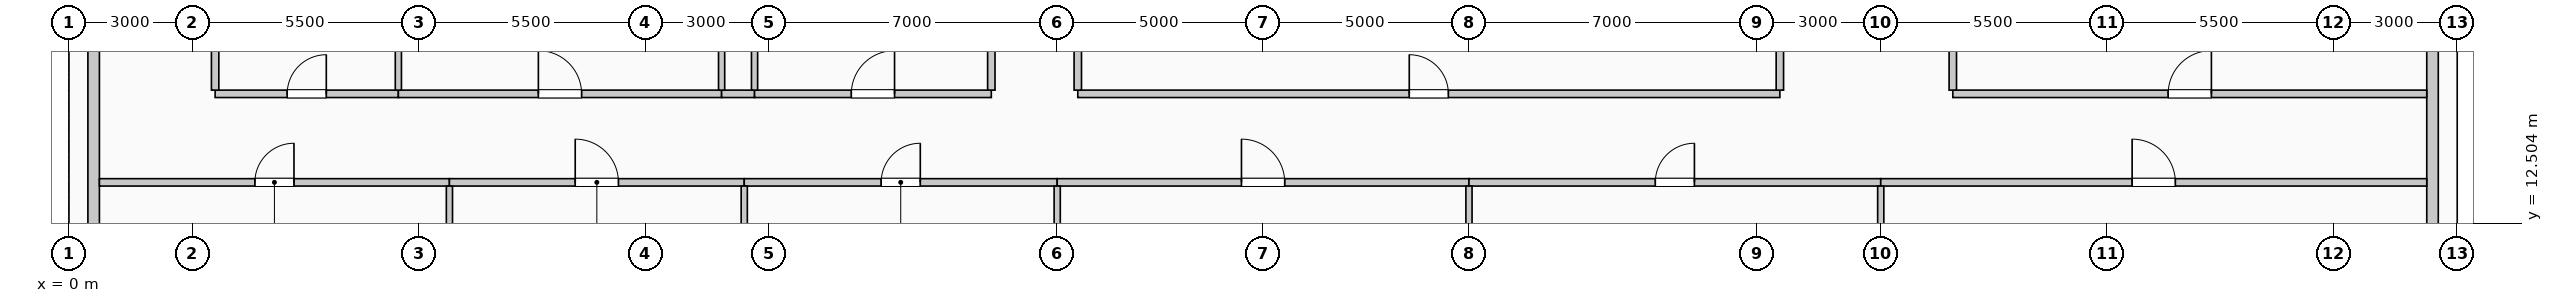
"""IFC4 building model, lengths in metres.
Left out: names, types, materials, properties, quantities, classifications, styles, units other than length and angle.
Written with IfcOpenShell. Run it as: python <this file> out.ifc"""

import sys

from ifc_helpers import new_model, si_unit, direction, frame, frame_2d, origin, place, context, subcontext, project, spatial, rectangle, extrude, element, fill, save


model = new_model("IFC4")
c1 = context("Model", 3, precision=1e-05, world=origin(), true_north=direction((0.0, 1.0)))
c2 = subcontext(c1, "Body", "Model", "MODEL_VIEW")
j1 = project(units=[si_unit("LENGTHUNIT", "METRE"), si_unit("PLANEANGLEUNIT", "RADIAN")], contexts=[c1])
p1 = place(None, origin())
s1 = spatial("IfcSite", under=j1, at=p1, CompositionType="ELEMENT")
p2 = place(p1, origin())
s2 = spatial("IfcBuilding", under=s1, at=p2, CompositionType="ELEMENT")
p3 = place(p2, frame((0.0, 0.0, 136.6)))
s3 = spatial("IfcBuildingStorey", under=s2, at=p3, CompositionType="ELEMENT", Elevation=136.6)
for number, where, z_axis, x_axis in (
    (1, (0.6, 10.445, 0.0), (0.0, 0.0, 1.0), (0.0, 1.0, 0.0)),
    (2, (57.4, 17.555, 0.0), (0.0, 0.0, 1.0), (0.0, -1.0, 0.0)),
):
    element("IfcWall", number, at=place(p3, frame(where, z_axis=z_axis, x_axis=x_axis)), inside=s3, PredefinedType="SOLIDWALL", context=c2, shape_type="SweptSolid", body=[
        extrude(rectangle(XDim=7.11, YDim=0.28, at=frame_2d((3.555, 0.0))), origin(), (0.0, 0.0, 1.0), 2.875),
    ])
p4 = place(p3, frame((0.74, 13.5, 0.0), z_axis=(0.0, 0.0, 1.0), x_axis=(1.0, 0.0, 0.0)))
e3 = element("IfcWall", 3, at=p4, inside=s3, PredefinedType="PARTITIONING", context=c2, shape_type="SweptSolid", body=[
    extrude(rectangle(XDim=8.5, YDim=0.18, at=frame_2d((4.25, 0.0))), origin(), (0.0, 0.0, 1.0), 3.725),
])
p5 = place(p4, frame((3.775, 0.0, 0.0)))
e4 = element("IfcOpeningElement", 4, at=p5, cuts=e3, PredefinedType="OPENING", context=c2, shape_type="SweptSolid", body=[
    extrude(rectangle(XDim=0.95, YDim=2.15, at=frame_2d((0.475, 1.075))), frame((0.0, 0.1, 0.0), z_axis=(0.0, -1.0, 0.0), x_axis=(1.0, 0.0, 0.0)), (0.0, 0.0, 1.0), 0.2),
])
p6 = place(p3, frame((9.24, 13.5, 0.0), z_axis=(0.0, 0.0, 1.0), x_axis=(1.0, 0.0, 0.0)))
e5 = element("IfcWall", 5, at=p6, inside=s3, PredefinedType="PARTITIONING", context=c2, shape_type="SweptSolid", body=[
    extrude(rectangle(XDim=7.16, YDim=0.18, at=frame_2d((3.58, 0.0))), origin(), (0.0, 0.0, 1.0), 3.725),
])
p7 = place(p6, frame((3.055, 0.0, 0.0)))
e6 = element("IfcOpeningElement", 6, at=p7, cuts=e5, PredefinedType="OPENING", context=c2, shape_type="SweptSolid", body=[
    extrude(rectangle(XDim=1.05, YDim=2.15, at=frame_2d((0.525, 1.075))), frame((0.0, 0.1, 0.0), z_axis=(0.0, -1.0, 0.0), x_axis=(1.0, 0.0, 0.0)), (0.0, 0.0, 1.0), 0.2),
])
p8 = place(p3, frame((16.4, 13.5, 0.0), z_axis=(0.0, 0.0, 1.0), x_axis=(1.0, 0.0, 0.0)))
e7 = element("IfcWall", 7, at=p8, inside=s3, PredefinedType="PARTITIONING", context=c2, shape_type="SweptSolid", body=[
    extrude(rectangle(XDim=7.6, YDim=0.18, at=frame_2d((3.8, 0.0))), origin(), (0.0, 0.0, 1.0), 3.725),
])
p9 = place(p8, frame((3.325, 0.0, 0.0)))
e8 = element("IfcOpeningElement", 8, at=p9, cuts=e7, PredefinedType="OPENING", context=c2, shape_type="SweptSolid", body=[
    extrude(rectangle(XDim=0.95, YDim=2.15, at=frame_2d((0.475, 1.075))), frame((0.0, 0.1, 0.0), z_axis=(0.0, -1.0, 0.0), x_axis=(1.0, 0.0, 0.0)), (0.0, 0.0, 1.0), 0.2),
])
p10 = place(p3, frame((24.0, 13.5, 0.0), z_axis=(0.0, 0.0, 1.0), x_axis=(1.0, 0.0, 0.0)))
e9 = element("IfcWall", 9, at=p10, inside=s3, PredefinedType="PARTITIONING", context=c2, shape_type="SweptSolid", body=[
    extrude(rectangle(XDim=10.0, YDim=0.18, at=frame_2d((5.0, 0.0))), origin(), (0.0, 0.0, 1.0), 3.725),
])
p11 = place(p10, frame((4.475, 0.0, 0.0)))
e10 = element("IfcOpeningElement", 10, at=p11, cuts=e9, PredefinedType="OPENING", context=c2, shape_type="SweptSolid", body=[
    extrude(rectangle(XDim=1.05, YDim=2.15, at=frame_2d((0.525, 1.075))), frame((0.0, 0.1, 0.0), z_axis=(0.0, -1.0, 0.0), x_axis=(1.0, 0.0, 0.0)), (0.0, 0.0, 1.0), 0.2),
])
p12 = place(p3, frame((34.0, 13.5, 0.0), z_axis=(0.0, 0.0, 1.0), x_axis=(1.0, 0.0, 0.0)))
e11 = element("IfcWall", 11, at=p12, inside=s3, PredefinedType="PARTITIONING", context=c2, shape_type="SweptSolid", body=[
    extrude(rectangle(XDim=10.0, YDim=0.18, at=frame_2d((5.0, 0.0))), origin(), (0.0, 0.0, 1.0), 3.725),
])
p13 = place(p12, frame((4.525, 0.0, 0.0)))
e12 = element("IfcOpeningElement", 12, at=p13, cuts=e11, PredefinedType="OPENING", context=c2, shape_type="SweptSolid", body=[
    extrude(rectangle(XDim=0.95, YDim=2.15, at=frame_2d((0.475, 1.075))), frame((0.0, 0.1, 0.0), z_axis=(0.0, -1.0, 0.0), x_axis=(1.0, 0.0, 0.0)), (0.0, 0.0, 1.0), 0.2),
])
p14 = place(p3, frame((44.0, 13.5, 0.0), z_axis=(0.0, 0.0, 1.0), x_axis=(1.0, 0.0, 0.0)))
e13 = element("IfcWall", 13, at=p14, inside=s3, PredefinedType="PARTITIONING", context=c2, shape_type="SweptSolid", body=[
    extrude(rectangle(XDim=13.26, YDim=0.18, at=frame_2d((6.63, 0.0))), origin(), (0.0, 0.0, 1.0), 3.725),
])
p15 = place(p14, frame((6.105, 0.0, 0.0)))
e14 = element("IfcOpeningElement", 14, at=p15, cuts=e13, PredefinedType="OPENING", context=c2, shape_type="SweptSolid", body=[
    extrude(rectangle(XDim=1.05, YDim=2.15, at=frame_2d((0.525, 1.075))), frame((0.0, 0.1, 0.0), z_axis=(0.0, -1.0, 0.0), x_axis=(1.0, 0.0, 0.0)), (0.0, 0.0, 1.0), 0.2),
])
p16 = place(p3, frame((3.55, 15.65, 0.0), z_axis=(0.0, 0.0, 1.0), x_axis=(1.0, 0.0, 0.0)))
e15 = element("IfcWall", 15, at=p16, inside=s3, PredefinedType="PARTITIONING", context=c2, shape_type="SweptSolid", body=[
    extrude(rectangle(XDim=4.45, YDim=0.18, at=frame_2d((2.225, 0.0))), origin(), (0.0, 0.0, 1.0), 3.725),
])
p17 = place(p16, frame((1.75, 0.0, 0.0)))
e16 = element("IfcOpeningElement", 16, at=p17, cuts=e15, PredefinedType="OPENING", context=c2, shape_type="SweptSolid", body=[
    extrude(rectangle(XDim=0.95, YDim=2.15, at=frame_2d((0.475, 1.075))), frame((0.0, 0.1, 0.0), z_axis=(0.0, -1.0, 0.0), x_axis=(1.0, 0.0, 0.0)), (0.0, 0.0, 1.0), 0.2),
])
p18 = place(p3, frame((8.0, 15.65, 0.0), z_axis=(0.0, 0.0, 1.0), x_axis=(1.0, 0.0, 0.0)))
e17 = element("IfcWall", 17, at=p18, inside=s3, PredefinedType="PARTITIONING", context=c2, shape_type="SweptSolid", body=[
    extrude(rectangle(XDim=7.85, YDim=0.18, at=frame_2d((3.925, 0.0))), origin(), (0.0, 0.0, 1.0), 3.725),
])
p19 = place(p18, frame((3.4, 0.0, 0.0)))
e18 = element("IfcOpeningElement", 18, at=p19, cuts=e17, PredefinedType="OPENING", context=c2, shape_type="SweptSolid", body=[
    extrude(rectangle(XDim=1.05, YDim=2.15, at=frame_2d((0.525, 1.075))), frame((0.0, 0.1, 0.0), z_axis=(0.0, -1.0, 0.0), x_axis=(1.0, 0.0, 0.0)), (0.0, 0.0, 1.0), 0.2),
])
p20 = place(p3, frame((15.85, 15.65, 0.0), z_axis=(0.0, 0.0, 1.0), x_axis=(1.0, 0.0, 0.0)))
e19 = element("IfcWall", 19, at=p20, inside=s3, PredefinedType="PARTITIONING", context=c2, shape_type="SweptSolid", body=[
    extrude(rectangle(XDim=0.8, YDim=0.18, at=frame_2d((0.4, 0.0))), origin(), (0.0, 0.0, 1.0), 3.725),
])
p21 = place(p3, frame((16.65, 15.65, 0.0), z_axis=(0.0, 0.0, 1.0), x_axis=(1.0, 0.0, 0.0)))
e20 = element("IfcWall", 20, at=p21, inside=s3, PredefinedType="PARTITIONING", context=c2, shape_type="SweptSolid", body=[
    extrude(rectangle(XDim=5.75, YDim=0.18, at=frame_2d((2.875, 0.0))), origin(), (0.0, 0.0, 1.0), 3.725),
])
p22 = place(p21, frame((2.35, 0.0, 0.0)))
e21 = element("IfcOpeningElement", 21, at=p22, cuts=e20, PredefinedType="OPENING", context=c2, shape_type="SweptSolid", body=[
    extrude(rectangle(XDim=1.05, YDim=2.15, at=frame_2d((0.525, 1.075))), frame((0.0, 0.1, 0.0), z_axis=(0.0, -1.0, 0.0), x_axis=(1.0, 0.0, 0.0)), (0.0, 0.0, 1.0), 0.2),
])
p23 = place(p3, frame((24.5, 15.65, 0.0), z_axis=(0.0, 0.0, 1.0), x_axis=(1.0, 0.0, 0.0)))
e22 = element("IfcWall", 22, at=p23, inside=s3, PredefinedType="PARTITIONING", context=c2, shape_type="SweptSolid", body=[
    extrude(rectangle(XDim=17.05, YDim=0.18, at=frame_2d((8.525, 0.0))), origin(), (0.0, 0.0, 1.0), 3.725),
])
p24 = place(p23, frame((8.05, 0.0, 0.0)))
e23 = element("IfcOpeningElement", 23, at=p24, cuts=e22, PredefinedType="OPENING", context=c2, shape_type="SweptSolid", body=[
    extrude(rectangle(XDim=0.95, YDim=2.15, at=frame_2d((0.475, 1.075))), frame((0.0, 0.1, 0.0), z_axis=(0.0, -1.0, 0.0), x_axis=(1.0, 0.0, 0.0)), (0.0, 0.0, 1.0), 0.2),
])
p25 = place(p3, frame((45.75, 15.65, 0.0), z_axis=(0.0, 0.0, 1.0), x_axis=(1.0, 0.0, 0.0)))
e24 = element("IfcWall", 24, at=p25, inside=s3, PredefinedType="PARTITIONING", context=c2, shape_type="SweptSolid", body=[
    extrude(rectangle(XDim=11.51, YDim=0.18, at=frame_2d((5.755, 0.0))), origin(), (0.0, 0.0, 1.0), 3.725),
])
p26 = place(p25, frame((5.23, 0.0, 0.0)))
e25 = element("IfcOpeningElement", 25, at=p26, cuts=e24, PredefinedType="OPENING", context=c2, shape_type="SweptSolid", body=[
    extrude(rectangle(XDim=1.05, YDim=2.15, at=frame_2d((0.525, 1.075))), frame((0.0, 0.1, 0.0), z_axis=(0.0, -1.0, 0.0), x_axis=(1.0, 0.0, 0.0)), (0.0, 0.0, 1.0), 0.2),
])
p27 = place(p3, frame((3.55, 15.74, 0.0), z_axis=(0.0, 0.0, 1.0), x_axis=(0.0, 1.0, 0.0)))
e26 = element("IfcWall", 26, at=p27, inside=s3, PredefinedType="PARTITIONING", context=c2, shape_type="SweptSolid", body=[
    extrude(rectangle(XDim=3.135, YDim=0.18, at=frame_2d((1.567, 0.0))), origin(), (0.0, 0.0, 1.0), 3.725),
])
p28 = place(p3, frame((8.0, 15.74, 0.0), z_axis=(0.0, 0.0, 1.0), x_axis=(0.0, 1.0, 0.0)))
e27 = element("IfcWall", 27, at=p28, inside=s3, PredefinedType="PARTITIONING", context=c2, shape_type="SweptSolid", body=[
    extrude(rectangle(XDim=3.135, YDim=0.15, at=frame_2d((1.567, 0.0))), origin(), (0.0, 0.0, 1.0), 3.725),
])
p29 = place(p3, frame((9.24, 0.74, 0.0), z_axis=(0.0, 0.0, 1.0), x_axis=(0.0, 1.0, 0.0)))
e28 = element("IfcWall", 28, at=p29, inside=s3, PredefinedType="PARTITIONING", context=c2, shape_type="SweptSolid", body=[
    extrude(rectangle(XDim=12.67, YDim=0.15, at=frame_2d((6.335, 0.0))), origin(), (0.0, 0.0, 1.0), 3.725),
])
p30 = place(p3, frame((15.85, 15.74, 0.0), z_axis=(0.0, 0.0, 1.0), x_axis=(0.0, 1.0, 0.0)))
e29 = element("IfcWall", 29, at=p30, inside=s3, PredefinedType="PARTITIONING", context=c2, shape_type="SweptSolid", body=[
    extrude(rectangle(XDim=1.76, YDim=0.15, at=frame_2d((0.88, 0.0))), origin(), (0.0, 0.0, 1.0), 3.725),
])
p31 = place(p3, frame((16.4, 1.3, 0.0), z_axis=(0.0, 0.0, 1.0), x_axis=(0.0, 1.0, 0.0)))
e30 = element("IfcWall", 30, at=p31, inside=s3, PredefinedType="PARTITIONING", context=c2, shape_type="SweptSolid", body=[
    extrude(rectangle(XDim=12.11, YDim=0.15, at=frame_2d((6.055, 0.0))), origin(), (0.0, 0.0, 1.0), 3.07),
])
p32 = place(p3, frame((16.65, 15.74, 0.0), z_axis=(0.0, 0.0, 1.0), x_axis=(0.0, 1.0, 0.0)))
e31 = element("IfcWall", 31, at=p32, inside=s3, PredefinedType="PARTITIONING", context=c2, shape_type="SweptSolid", body=[
    extrude(rectangle(XDim=1.76, YDim=0.15, at=frame_2d((0.88, 0.0))), origin(), (0.0, 0.0, 1.0), 3.07),
])
p33 = place(p3, frame((22.4, 15.74, 0.0), z_axis=(0.0, 0.0, 1.0), x_axis=(0.0, 1.0, 0.0)))
e32 = element("IfcWall", 32, at=p33, inside=s3, PredefinedType="PARTITIONING", context=c2, shape_type="SweptSolid", body=[
    extrude(rectangle(XDim=13.985, YDim=0.18, at=frame_2d((6.993, 0.0))), origin(), (0.0, 0.0, 1.0), 3.725),
])
p34 = place(p3, frame((24.0, 1.3, 0.0), z_axis=(0.0, 0.0, 1.0), x_axis=(0.0, 1.0, 0.0)))
e33 = element("IfcWall", 33, at=p34, inside=s3, PredefinedType="PARTITIONING", context=c2, shape_type="SweptSolid", body=[
    extrude(rectangle(XDim=12.11, YDim=0.15, at=frame_2d((6.055, 0.0))), origin(), (0.0, 0.0, 1.0), 3.725),
])
p35 = place(p3, frame((24.5, 15.74, 0.0), z_axis=(0.0, 0.0, 1.0), x_axis=(0.0, 1.0, 0.0)))
e34 = element("IfcWall", 34, at=p35, inside=s3, PredefinedType="PARTITIONING", context=c2, shape_type="SweptSolid", body=[
    extrude(rectangle(XDim=15.97, YDim=0.18, at=frame_2d((7.985, 0.0))), origin(), (0.0, 0.0, 1.0), 3.725),
])
p36 = place(p3, frame((34.0, 1.3, 0.0), z_axis=(0.0, 0.0, 1.0), x_axis=(0.0, 1.0, 0.0)))
e35 = element("IfcWall", 35, at=p36, inside=s3, PredefinedType="PARTITIONING", context=c2, shape_type="SweptSolid", body=[
    extrude(rectangle(XDim=12.11, YDim=0.15, at=frame_2d((6.055, 0.0))), origin(), (0.0, 0.0, 1.0), 3.725),
])
p37 = place(p3, frame((41.55, 15.74, 0.0), z_axis=(0.0, 0.0, 1.0), x_axis=(0.0, 1.0, 0.0)))
e36 = element("IfcWall", 36, at=p37, inside=s3, PredefinedType="PARTITIONING", context=c2, shape_type="SweptSolid", body=[
    extrude(rectangle(XDim=1.76, YDim=0.18, at=frame_2d((0.88, 0.0))), origin(), (0.0, 0.0, 1.0), 3.07),
])
p38 = place(p3, frame((44.0, 1.175, 0.0), z_axis=(0.0, 0.0, 1.0), x_axis=(0.0, 1.0, 0.0)))
e37 = element("IfcWall", 37, at=p38, inside=s3, PredefinedType="PARTITIONING", context=c2, shape_type="SweptSolid", body=[
    extrude(rectangle(XDim=12.235, YDim=0.15, at=frame_2d((6.117, 0.0))), origin(), (0.0, 0.0, 1.0), 3.725),
])
p39 = place(p3, frame((45.75, 15.74, 0.0), z_axis=(0.0, 0.0, 1.0), x_axis=(0.0, 1.0, 0.0)))
e38 = element("IfcWall", 38, at=p39, inside=s3, PredefinedType="PARTITIONING", context=c2, shape_type="SweptSolid", body=[
    extrude(rectangle(XDim=16.535, YDim=0.18, at=frame_2d((8.268, 0.0))), origin(), (0.0, 0.0, 1.0), 3.725),
])
p40 = place(p5, origin())
e39 = element("IfcDoor", 39, at=p40, inside=s3, OperationType="SINGLE_SWING_RIGHT", PredefinedType="DOOR", context=c2, shape_type="SweptSolid", body=[
    extrude(rectangle(XDim=0.95, YDim=2.15, at=frame_2d((0.475, 1.075))), frame((0.0, 0.025, 0.0), z_axis=(0.0, -1.0, 0.0), x_axis=(1.0, 0.0, 0.0)), (0.0, 0.0, 1.0), 0.05),
])
fill(e4, e39)
p41 = place(p7, origin())
e40 = element("IfcDoor", 40, at=p41, inside=s3, OperationType="SINGLE_SWING_LEFT", PredefinedType="DOOR", context=c2, shape_type="SweptSolid", body=[
    extrude(rectangle(XDim=1.05, YDim=2.15, at=frame_2d((0.525, 1.075))), frame((0.0, 0.025, 0.0), z_axis=(0.0, -1.0, 0.0), x_axis=(1.0, 0.0, 0.0)), (0.0, 0.0, 1.0), 0.05),
])
fill(e6, e40)
p42 = place(p9, origin())
e41 = element("IfcDoor", 41, at=p42, inside=s3, OperationType="SINGLE_SWING_RIGHT", PredefinedType="DOOR", context=c2, shape_type="SweptSolid", body=[
    extrude(rectangle(XDim=0.95, YDim=2.15, at=frame_2d((0.475, 1.075))), frame((0.0, 0.025, 0.0), z_axis=(0.0, -1.0, 0.0), x_axis=(1.0, 0.0, 0.0)), (0.0, 0.0, 1.0), 0.05),
])
fill(e8, e41)
p43 = place(p11, origin())
e42 = element("IfcDoor", 42, at=p43, inside=s3, OperationType="SINGLE_SWING_LEFT", PredefinedType="DOOR", context=c2, shape_type="SweptSolid", body=[
    extrude(rectangle(XDim=1.05, YDim=2.15, at=frame_2d((0.525, 1.075))), frame((0.0, 0.025, 0.0), z_axis=(0.0, -1.0, 0.0), x_axis=(1.0, 0.0, 0.0)), (0.0, 0.0, 1.0), 0.05),
])
fill(e10, e42)
p44 = place(p13, origin())
e43 = element("IfcDoor", 43, at=p44, inside=s3, OperationType="SINGLE_SWING_RIGHT", PredefinedType="DOOR", context=c2, shape_type="SweptSolid", body=[
    extrude(rectangle(XDim=0.95, YDim=2.15, at=frame_2d((0.475, 1.075))), frame((0.0, 0.025, 0.0), z_axis=(0.0, -1.0, 0.0), x_axis=(1.0, 0.0, 0.0)), (0.0, 0.0, 1.0), 0.05),
])
fill(e12, e43)
p45 = place(p15, origin())
e44 = element("IfcDoor", 44, at=p45, inside=s3, OperationType="SINGLE_SWING_LEFT", PredefinedType="DOOR", context=c2, shape_type="SweptSolid", body=[
    extrude(rectangle(XDim=1.05, YDim=2.15, at=frame_2d((0.525, 1.075))), frame((0.0, 0.025, 0.0), z_axis=(0.0, -1.0, 0.0), x_axis=(1.0, 0.0, 0.0)), (0.0, 0.0, 1.0), 0.05),
])
fill(e14, e44)
p46 = place(p17, origin())
e45 = element("IfcDoor", 45, at=p46, inside=s3, OperationType="SINGLE_SWING_RIGHT", PredefinedType="DOOR", context=c2, shape_type="SweptSolid", body=[
    extrude(rectangle(XDim=0.95, YDim=2.15, at=frame_2d((0.475, 1.075))), frame((0.0, 0.025, 0.0), z_axis=(0.0, -1.0, 0.0), x_axis=(1.0, 0.0, 0.0)), (0.0, 0.0, 1.0), 0.05),
])
fill(e16, e45)
p47 = place(p19, origin())
e46 = element("IfcDoor", 46, at=p47, inside=s3, OperationType="SINGLE_SWING_LEFT", PredefinedType="DOOR", context=c2, shape_type="SweptSolid", body=[
    extrude(rectangle(XDim=1.05, YDim=2.15, at=frame_2d((0.525, 1.075))), frame((0.0, 0.025, 0.0), z_axis=(0.0, -1.0, 0.0), x_axis=(1.0, 0.0, 0.0)), (0.0, 0.0, 1.0), 0.05),
])
fill(e18, e46)
p48 = place(p22, origin())
e47 = element("IfcDoor", 47, at=p48, inside=s3, OperationType="SINGLE_SWING_RIGHT", PredefinedType="DOOR", context=c2, shape_type="SweptSolid", body=[
    extrude(rectangle(XDim=1.05, YDim=2.15, at=frame_2d((0.525, 1.075))), frame((0.0, 0.025, 0.0), z_axis=(0.0, -1.0, 0.0), x_axis=(1.0, 0.0, 0.0)), (0.0, 0.0, 1.0), 0.05),
])
fill(e21, e47)
p49 = place(p24, origin())
e48 = element("IfcDoor", 48, at=p49, inside=s3, OperationType="SINGLE_SWING_LEFT", PredefinedType="DOOR", context=c2, shape_type="SweptSolid", body=[
    extrude(rectangle(XDim=0.95, YDim=2.15, at=frame_2d((0.475, 1.075))), frame((0.0, 0.025, 0.0), z_axis=(0.0, -1.0, 0.0), x_axis=(1.0, 0.0, 0.0)), (0.0, 0.0, 1.0), 0.05),
])
fill(e23, e48)
p50 = place(p26, origin())
e49 = element("IfcDoor", 49, at=p50, inside=s3, OperationType="SINGLE_SWING_RIGHT", PredefinedType="DOOR", context=c2, shape_type="SweptSolid", body=[
    extrude(rectangle(XDim=1.05, YDim=2.15, at=frame_2d((0.525, 1.075))), frame((0.0, 0.025, 0.0), z_axis=(0.0, -1.0, 0.0), x_axis=(1.0, 0.0, 0.0)), (0.0, 0.0, 1.0), 0.05),
])
fill(e25, e49)
save(model, sys.argv[1])
